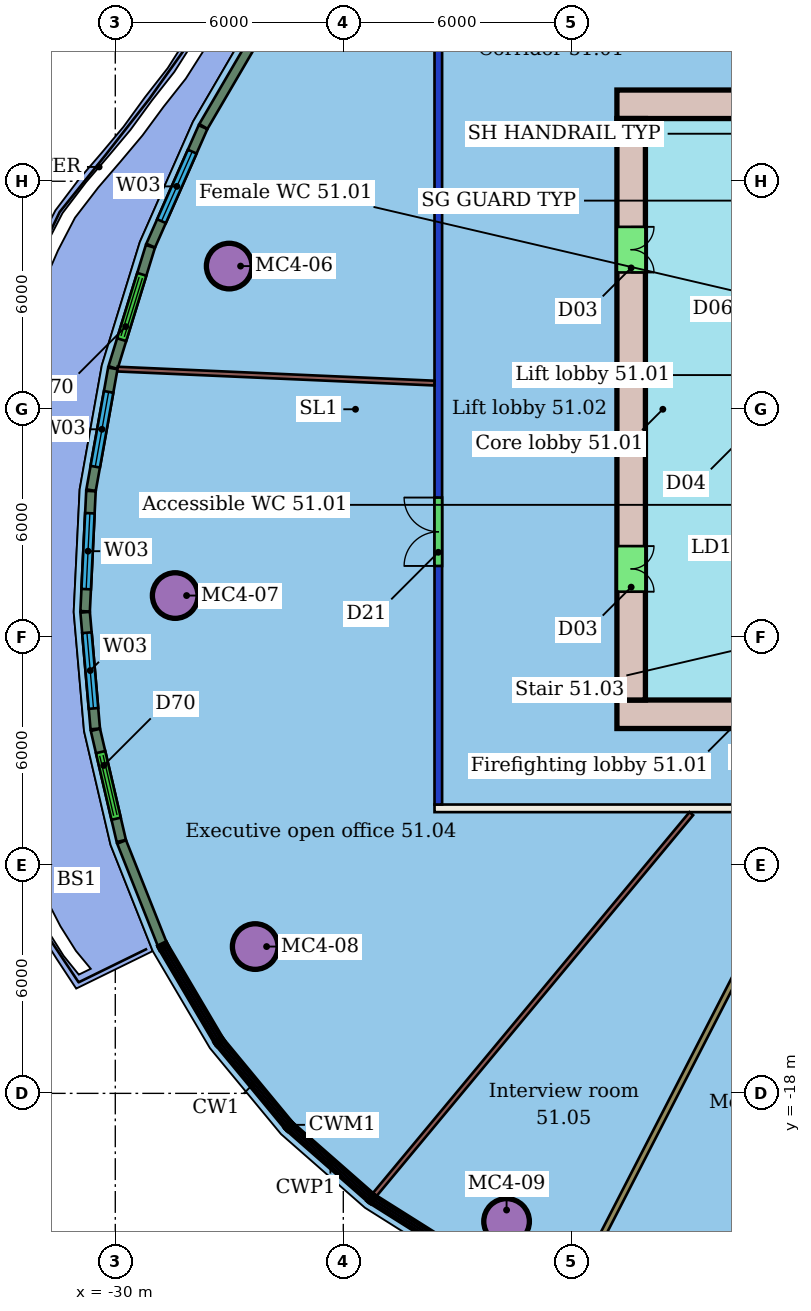
"""IFC4 building model, lengths in metres.
Left out: names, types, materials, properties, quantities, classifications, styles, units other than length and angle.
Written with IfcOpenShell. Run it as: python <this file> out.ifc"""

import sys

from ifc_helpers import new_model, si_unit, direction, frame, frame_2d, origin, origin_2d, place, context, subcontext, project, spatial, rectangle, hollow_circle, extrude, element, fill, save


model = new_model("IFC4")
c1 = context("Model", 3, precision=1e-05, world=origin(), true_north=direction((0.0, 1.0)))
c2 = subcontext(c1, "Body", "Model", "MODEL_VIEW")
j1 = project(units=[si_unit("LENGTHUNIT", "METRE"), si_unit("PLANEANGLEUNIT", "RADIAN")], contexts=[c1])
p1 = place(None, origin())
s1 = spatial("IfcSite", under=j1, at=p1, CompositionType="ELEMENT")
p2 = place(p1, origin())
s2 = spatial("IfcBuilding", under=s1, at=p2, CompositionType="ELEMENT")
p3 = place(p2, frame((0.0, 0.0, 210.1)))
s3 = spatial("IfcBuildingStorey", under=s2, at=p3, CompositionType="ELEMENT", Elevation=210.1)
for number, where, z_axis, x_axis in (
    (1, (-27.003, 3.768, 0.0), (0.0, 0.0, 1.0), (1.0, 0.0, 0.0)),
    (2, (-28.424, -4.901, 0.0), (0.0, 0.0, 1.0), (1.0, 0.0, 0.0)),
    (3, (-26.318, -14.137, 0.0), (0.0, 0.0, 1.0), (1.0, 0.0, 0.0)),
    (4, (-19.704, -21.37, 0.0), (0.0, 0.0, 1.0), (1.0, 0.0, 0.0)),
):
    element("IfcColumn", number, at=place(p3, frame(where, z_axis=z_axis, x_axis=x_axis)), inside=s3, PredefinedType="COLUMN", context=c2, shape_type="SweptSolid", body=[
        extrude(hollow_circle(Radius=0.6, WallThickness=0.045, at=origin_2d()), origin(), (0.0, 0.0, 1.0), 3.45),
    ])
p4 = place(p3, frame((9.6, -10.5, 0.0), z_axis=(0.0, 0.0, 1.0), x_axis=(-1.0, 0.0, 0.0)))
e5 = element("IfcWall", 5, at=p4, inside=s3, PredefinedType="PARTITIONING", context=c2, shape_type="SweptSolid", body=[
    extrude(rectangle(XDim=31.2, YDim=0.2, at=frame_2d((15.6, 0.0))), origin(), (0.0, 0.0, 1.0), 3.45),
])
p5 = place(p4, frame((21.96, 0.0, 0.0)))
e6 = element("IfcOpeningElement", 6, at=p5, cuts=e5, PredefinedType="OPENING", context=c2, shape_type="SweptSolid", body=[
    extrude(rectangle(XDim=0.9, YDim=2.1, at=frame_2d((0.45, 1.05))), frame((0.0, 0.11, 0.0), z_axis=(0.0, -1.0, 0.0), x_axis=(1.0, 0.0, 0.0)), (0.0, 0.0, 1.0), 0.22),
])
p6 = place(p4, frame((18.96, 0.0, 0.0)))
e7 = element("IfcOpeningElement", 7, at=p6, cuts=e5, PredefinedType="OPENING", context=c2, shape_type="SweptSolid", body=[
    extrude(rectangle(XDim=0.9, YDim=2.1, at=frame_2d((0.45, 1.05))), frame((0.0, 0.11, 0.0), z_axis=(0.0, -1.0, 0.0), x_axis=(1.0, 0.0, 0.0)), (0.0, 0.0, 1.0), 0.22),
])
p7 = place(p4, frame((8.428, 0.0, 0.0)))
e8 = element("IfcOpeningElement", 8, at=p7, cuts=e5, PredefinedType="OPENING", context=c2, shape_type="SweptSolid", body=[
    extrude(rectangle(XDim=1.8, YDim=2.4, at=frame_2d((0.9, 1.2))), frame((0.0, 0.11, 0.0), z_axis=(0.0, -1.0, 0.0), x_axis=(1.0, 0.0, 0.0)), (0.0, 0.0, 1.0), 0.22),
])
p8 = place(p4, frame((2.814, 0.0, 0.0)))
e9 = element("IfcOpeningElement", 9, at=p8, cuts=e5, PredefinedType="OPENING", context=c2, shape_type="SweptSolid", body=[
    extrude(rectangle(XDim=1.0, YDim=2.4, at=frame_2d((0.5, 1.2))), frame((0.0, 0.11, 0.0), z_axis=(0.0, -1.0, 0.0), x_axis=(1.0, 0.0, 0.0)), (0.0, 0.0, 1.0), 0.22),
])
p9 = place(p3, frame((-21.5, -10.4, 0.0), z_axis=(0.0, 0.0, 1.0), x_axis=(0.0, 1.0, 0.0)))
e10 = element("IfcWall", 10, at=p9, inside=s3, PredefinedType="PARTITIONING", context=c2, shape_type="SweptSolid", body=[
    extrude(rectangle(XDim=20.8, YDim=0.2, at=frame_2d((10.4, 0.0))), origin(), (0.0, 0.0, 1.0), 3.05),
])
p10 = place(p9, frame((6.277, 0.0, 0.0)))
e11 = element("IfcOpeningElement", 11, at=p10, cuts=e10, PredefinedType="OPENING", context=c2, shape_type="SweptSolid", body=[
    extrude(rectangle(XDim=1.8, YDim=2.1, at=frame_2d((0.9, 1.05))), frame((0.0, 0.11, 0.0), z_axis=(0.0, -1.0, 0.0), x_axis=(1.0, 0.0, 0.0)), (0.0, 0.0, 1.0), 0.22),
])
p11 = place(p3, frame((-29.941, 1.057, 0.0), z_axis=(0.0, 0.0, 1.0), x_axis=(0.999026681185, -0.044109979365, 0.0)))
e12 = element("IfcWall", 12, at=p11, inside=s3, PredefinedType="PARTITIONING", context=c2, shape_type="SweptSolid", body=[
    extrude(rectangle(XDim=8.346, YDim=0.125, at=frame_2d((4.173, 0.0))), origin(), (0.0, 0.0, 1.0), 3.45),
])
p12 = place(p3, frame((-23.177, -20.668, 0.0), z_axis=(0.0, 0.0, 1.0), x_axis=(0.639167269964, 0.769067747995, 0.0)))
e13 = element("IfcWall", 13, at=p12, inside=s3, PredefinedType="PARTITIONING", context=c2, shape_type="SweptSolid", body=[
    extrude(rectangle(XDim=13.04, YDim=0.125, at=frame_2d((6.52, 0.0))), origin(), (0.0, 0.0, 1.0), 3.45),
])
p13 = place(p3, frame((-18.025, -23.377, 0.0), z_axis=(0.0, 0.0, 1.0), x_axis=(0.457440787156, 0.88924008358, 0.0)))
e14 = element("IfcWall", 14, at=p13, inside=s3, PredefinedType="PARTITIONING", context=c2, shape_type="SweptSolid", body=[
    extrude(rectangle(XDim=14.33, YDim=0.15, at=frame_2d((7.165, 0.0))), origin(), (0.0, 0.0, 1.0), 3.45),
])
p14 = place(p3, frame((-25.956, 10.396, 0.0), z_axis=(0.0, 0.0, 1.0), x_axis=(-0.504456760021, -0.863436956164, 0.0)))
e15 = element("IfcWall", 15, at=p14, inside=s3, PredefinedType="SOLIDWALL", context=c2, shape_type="SweptSolid", body=[
    extrude(rectangle(XDim=3.42, YDim=0.25, at=frame_2d((1.71, 0.0))), origin(), (0.0, 0.0, 1.0), 3.1),
])
p15 = place(p3, frame((-27.691, 7.423, 0.0), z_axis=(0.0, 0.0, 1.0), x_axis=(-0.404116447322, -0.914707547254, 0.0)))
e16 = element("IfcWall", 16, at=p15, inside=s3, PredefinedType="SOLIDWALL", context=c2, shape_type="SweptSolid", body=[
    extrude(rectangle(XDim=3.407, YDim=0.25, at=frame_2d((1.704, 0.0))), origin(), (0.0, 0.0, 1.0), 3.1),
])
p16 = place(p15, frame((0.704, 0.0, 0.9)))
e17 = element("IfcOpeningElement", 17, at=p16, cuts=e16, PredefinedType="OPENING", context=c2, shape_type="SweptSolid", body=[
    extrude(rectangle(XDim=2.0, YDim=2.1, at=frame_2d((1.0, 1.05))), frame((0.0, 0.135, 0.0), z_axis=(0.0, -1.0, 0.0), x_axis=(1.0, 0.0, 0.0)), (0.0, 0.0, 1.0), 0.27),
])
p17 = place(p3, frame((-29.076, 4.285, 0.0), z_axis=(0.0, 0.0, 1.0), x_axis=(-0.294651514305, -0.955604774537, 0.0)))
e18 = element("IfcWall", 18, at=p17, inside=s3, PredefinedType="SOLIDWALL", context=c2, shape_type="SweptSolid", body=[
    extrude(rectangle(XDim=3.336, YDim=0.25, at=frame_2d((1.668, 0.0))), origin(), (0.0, 0.0, 1.0), 3.1),
])
p18 = place(p17, frame((0.768, 0.0, 0.0)))
e19 = element("IfcOpeningElement", 19, at=p18, cuts=e18, PredefinedType="OPENING", context=c2, shape_type="SweptSolid", body=[
    extrude(rectangle(XDim=1.8, YDim=2.4, at=frame_2d((0.9, 1.2))), frame((0.0, 0.135, 0.0), z_axis=(0.0, -1.0, 0.0), x_axis=(1.0, 0.0, 0.0)), (0.0, 0.0, 1.0), 0.27),
])
p19 = place(p3, frame((-30.065, 1.075, 0.0), z_axis=(0.0, 0.0, 1.0), x_axis=(-0.176006154206, -0.984389066214, 0.0)))
e20 = element("IfcWall", 20, at=p19, inside=s3, PredefinedType="SOLIDWALL", context=c2, shape_type="SweptSolid", body=[
    extrude(rectangle(XDim=3.254, YDim=0.25, at=frame_2d((1.627, 0.0))), origin(), (0.0, 0.0, 1.0), 3.1),
])
p20 = place(p19, frame((0.627, 0.0, 0.9)))
e21 = element("IfcOpeningElement", 21, at=p20, cuts=e20, PredefinedType="OPENING", context=c2, shape_type="SweptSolid", body=[
    extrude(rectangle(XDim=2.0, YDim=2.1, at=frame_2d((1.0, 1.05))), frame((0.0, 0.135, 0.0), z_axis=(0.0, -1.0, 0.0), x_axis=(1.0, 0.0, 0.0)), (0.0, 0.0, 1.0), 0.27),
])
p21 = place(p3, frame((-30.64, -2.152, 0.0), z_axis=(0.0, 0.0, 1.0), x_axis=(-0.048561254051, -0.998820206346, 0.0)))
e22 = element("IfcWall", 22, at=p21, inside=s3, PredefinedType="SOLIDWALL", context=c2, shape_type="SweptSolid", body=[
    extrude(rectangle(XDim=3.167, YDim=0.25, at=frame_2d((1.583, 0.0))), origin(), (0.0, 0.0, 1.0), 3.1),
])
p22 = place(p21, frame((0.584, 0.0, 0.9)))
e23 = element("IfcOpeningElement", 23, at=p22, cuts=e22, PredefinedType="OPENING", context=c2, shape_type="SweptSolid", body=[
    extrude(rectangle(XDim=2.0, YDim=2.1, at=frame_2d((1.0, 1.05))), frame((0.0, 0.135, 0.0), z_axis=(0.0, -1.0, 0.0), x_axis=(1.0, 0.0, 0.0)), (0.0, 0.0, 1.0), 0.27),
])
p23 = place(p3, frame((-30.793, -5.341, 0.0), z_axis=(0.0, 0.0, 1.0), x_axis=(0.086527038648, -0.996249502676, 0.0)))
e24 = element("IfcWall", 24, at=p23, inside=s3, PredefinedType="SOLIDWALL", context=c2, shape_type="SweptSolid", body=[
    extrude(rectangle(XDim=3.081, YDim=0.25, at=frame_2d((1.541, 0.0))), origin(), (0.0, 0.0, 1.0), 3.1),
])
p24 = place(p23, frame((0.541, 0.0, 0.9)))
e25 = element("IfcOpeningElement", 25, at=p24, cuts=e24, PredefinedType="OPENING", context=c2, shape_type="SweptSolid", body=[
    extrude(rectangle(XDim=2.0, YDim=2.1, at=frame_2d((1.0, 1.05))), frame((0.0, 0.135, 0.0), z_axis=(0.0, -1.0, 0.0), x_axis=(1.0, 0.0, 0.0)), (0.0, 0.0, 1.0), 0.27),
])
p25 = place(p3, frame((-30.523, -8.436, 0.0), z_axis=(0.0, 0.0, 1.0), x_axis=(0.226926203239, -0.973911956125, 0.0)))
e26 = element("IfcWall", 26, at=p25, inside=s3, PredefinedType="SOLIDWALL", context=c2, shape_type="SweptSolid", body=[
    extrude(rectangle(XDim=3.002, YDim=0.25, at=frame_2d((1.501, 0.0))), origin(), (0.0, 0.0, 1.0), 3.1),
])
p26 = place(p25, frame((0.601, 0.0, 0.0)))
e27 = element("IfcOpeningElement", 27, at=p26, cuts=e26, PredefinedType="OPENING", context=c2, shape_type="SweptSolid", body=[
    extrude(rectangle(XDim=1.8, YDim=2.4, at=frame_2d((0.9, 1.2))), frame((0.0, 0.135, 0.0), z_axis=(0.0, -1.0, 0.0), x_axis=(1.0, 0.0, 0.0)), (0.0, 0.0, 1.0), 0.27),
])
p27 = place(p3, frame((-29.833, -11.384, 0.0), z_axis=(0.0, 0.0, 1.0), x_axis=(0.369061887555, -0.929404821999, 0.0)))
e28 = element("IfcWall", 28, at=p27, inside=s3, PredefinedType="SOLIDWALL", context=c2, shape_type="SweptSolid", body=[
    extrude(rectangle(XDim=2.894, YDim=0.25, at=frame_2d((1.447, 0.0))), origin(), (0.0, 0.0, 1.0), 3.1),
])
p28 = place(p3, frame((-6.0, 8.025, 0.0), z_axis=(0.0, 0.0, 1.0), x_axis=(-1.0, 0.0, 0.0)))
e29 = element("IfcWall", 29, at=p28, inside=s3, PredefinedType="SHEAR", context=c2, shape_type="SweptSolid", body=[
    extrude(rectangle(XDim=10.8, YDim=0.75, at=frame_2d((5.4, 0.0))), origin(), (0.0, 0.0, 1.0), 3.3),
])
p29 = place(p28, frame((5.2, 0.0, 0.0)))
e30 = element("IfcOpeningElement", 30, at=p29, cuts=e29, PredefinedType="OPENING", context=c2, shape_type="SweptSolid", body=[
    extrude(rectangle(XDim=1.2, YDim=2.1, at=frame_2d((0.6, 1.05))), frame((0.0, 0.385, 0.0), z_axis=(0.0, -1.0, 0.0), x_axis=(1.0, 0.0, 0.0)), (0.0, 0.0, 1.0), 0.77),
])
p30 = place(p3, frame((-16.8, -8.025, 0.0), z_axis=(0.0, 0.0, 1.0), x_axis=(1.0, 0.0, 0.0)))
e31 = element("IfcWall", 31, at=p30, inside=s3, PredefinedType="SHEAR", context=c2, shape_type="SweptSolid", body=[
    extrude(rectangle(XDim=21.6, YDim=0.75, at=frame_2d((10.8, 0.0))), origin(), (0.0, 0.0, 1.0), 3.3),
])
p31 = place(p30, frame((4.8, 0.0, 0.0)))
e32 = element("IfcOpeningElement", 32, at=p31, cuts=e31, PredefinedType="OPENING", context=c2, shape_type="SweptSolid", body=[
    extrude(rectangle(XDim=1.2, YDim=2.1, at=frame_2d((0.6, 1.05))), frame((0.0, 0.385, 0.0), z_axis=(0.0, -1.0, 0.0), x_axis=(1.0, 0.0, 0.0)), (0.0, 0.0, 1.0), 0.77),
])
p32 = place(p3, frame((-16.425, 7.65, 0.0), z_axis=(0.0, 0.0, 1.0), x_axis=(0.0, -1.0, 0.0)))
e33 = element("IfcWall", 33, at=p32, inside=s3, PredefinedType="SHEAR", context=c2, shape_type="SweptSolid", body=[
    extrude(rectangle(XDim=15.3, YDim=0.75, at=frame_2d((7.65, 0.0))), origin(), (0.0, 0.0, 1.0), 3.3),
])
p33 = place(p32, frame((11.25, 0.0, 0.0)))
e34 = element("IfcOpeningElement", 34, at=p33, cuts=e33, PredefinedType="OPENING", context=c2, shape_type="SweptSolid", body=[
    extrude(rectangle(XDim=1.2, YDim=2.1, at=frame_2d((0.6, 1.05))), frame((0.0, 0.385, 0.0), z_axis=(0.0, -1.0, 0.0), x_axis=(1.0, 0.0, 0.0)), (0.0, 0.0, 1.0), 0.77),
])
p34 = place(p32, frame((2.85, 0.0, 0.0)))
e35 = element("IfcOpeningElement", 35, at=p34, cuts=e33, PredefinedType="OPENING", context=c2, shape_type="SweptSolid", body=[
    extrude(rectangle(XDim=1.2, YDim=2.1, at=frame_2d((0.6, 1.05))), frame((0.0, 0.385, 0.0), z_axis=(0.0, -1.0, 0.0), x_axis=(1.0, 0.0, 0.0)), (0.0, 0.0, 1.0), 0.77),
])
p35 = place(p10, origin())
e36 = element("IfcDoor", 36, at=p35, inside=s3, OperationType="DOUBLE_DOOR_SINGLE_SWING", PredefinedType="DOOR", context=c2, shape_type="SweptSolid", body=[
    extrude(rectangle(XDim=1.8, YDim=2.1, at=frame_2d((0.9, 1.05))), frame((0.0, 0.025, 0.0), z_axis=(0.0, -1.0, 0.0), x_axis=(1.0, 0.0, 0.0)), (0.0, 0.0, 1.0), 0.05),
])
fill(e11, e36)
p36 = place(p16, origin())
e37 = element("IfcWindow", 37, at=p36, inside=s3, PartitioningType="SINGLE_PANEL", PredefinedType="WINDOW", context=c2, shape_type="SweptSolid", body=[
    extrude(rectangle(XDim=2.0, YDim=2.1, at=frame_2d((1.0, 1.05))), frame((0.0, 0.03, 0.0), z_axis=(0.0, -1.0, 0.0), x_axis=(1.0, 0.0, 0.0)), (0.0, 0.0, 1.0), 0.06),
])
fill(e17, e37)
p37 = place(p18, origin())
e38 = element("IfcDoor", 38, at=p37, inside=s3, OperationType="DOUBLE_DOOR_SLIDING", PredefinedType="DOOR", context=c2, shape_type="SweptSolid", body=[
    extrude(rectangle(XDim=1.8, YDim=2.4, at=frame_2d((0.9, 1.2))), frame((0.0, 0.025, 0.0), z_axis=(0.0, -1.0, 0.0), x_axis=(1.0, 0.0, 0.0)), (0.0, 0.0, 1.0), 0.05),
])
fill(e19, e38)
p38 = place(p20, origin())
e39 = element("IfcWindow", 39, at=p38, inside=s3, PartitioningType="SINGLE_PANEL", PredefinedType="WINDOW", context=c2, shape_type="SweptSolid", body=[
    extrude(rectangle(XDim=2.0, YDim=2.1, at=frame_2d((1.0, 1.05))), frame((0.0, 0.03, 0.0), z_axis=(0.0, -1.0, 0.0), x_axis=(1.0, 0.0, 0.0)), (0.0, 0.0, 1.0), 0.06),
])
fill(e21, e39)
p39 = place(p22, origin())
e40 = element("IfcWindow", 40, at=p39, inside=s3, PartitioningType="SINGLE_PANEL", PredefinedType="WINDOW", context=c2, shape_type="SweptSolid", body=[
    extrude(rectangle(XDim=2.0, YDim=2.1, at=frame_2d((1.0, 1.05))), frame((0.0, 0.03, 0.0), z_axis=(0.0, -1.0, 0.0), x_axis=(1.0, 0.0, 0.0)), (0.0, 0.0, 1.0), 0.06),
])
fill(e23, e40)
p40 = place(p24, origin())
e41 = element("IfcWindow", 41, at=p40, inside=s3, PartitioningType="SINGLE_PANEL", PredefinedType="WINDOW", context=c2, shape_type="SweptSolid", body=[
    extrude(rectangle(XDim=2.0, YDim=2.1, at=frame_2d((1.0, 1.05))), frame((0.0, 0.03, 0.0), z_axis=(0.0, -1.0, 0.0), x_axis=(1.0, 0.0, 0.0)), (0.0, 0.0, 1.0), 0.06),
])
fill(e25, e41)
p41 = place(p26, origin())
e42 = element("IfcDoor", 42, at=p41, inside=s3, OperationType="DOUBLE_DOOR_SLIDING", PredefinedType="DOOR", context=c2, shape_type="SweptSolid", body=[
    extrude(rectangle(XDim=1.8, YDim=2.4, at=frame_2d((0.9, 1.2))), frame((0.0, 0.025, 0.0), z_axis=(0.0, -1.0, 0.0), x_axis=(1.0, 0.0, 0.0)), (0.0, 0.0, 1.0), 0.05),
])
fill(e27, e42)
p42 = place(p33, origin())
e43 = element("IfcDoor", 43, at=p42, inside=s3, OperationType="DOUBLE_DOOR_SINGLE_SWING", PredefinedType="NOTDEFINED", context=c2, shape_type="SweptSolid", body=[
    extrude(rectangle(XDim=1.2, YDim=2.1, at=frame_2d((0.6, 1.05))), frame((0.0, 0.025, 0.0), z_axis=(0.0, -1.0, 0.0), x_axis=(1.0, 0.0, 0.0)), (0.0, 0.0, 1.0), 0.05),
])
fill(e34, e43)
p43 = place(p34, origin())
e44 = element("IfcDoor", 44, at=p43, inside=s3, OperationType="DOUBLE_DOOR_SINGLE_SWING", PredefinedType="NOTDEFINED", context=c2, shape_type="SweptSolid", body=[
    extrude(rectangle(XDim=1.2, YDim=2.1, at=frame_2d((0.6, 1.05))), frame((0.0, 0.025, 0.0), z_axis=(0.0, -1.0, 0.0), x_axis=(1.0, 0.0, 0.0)), (0.0, 0.0, 1.0), 0.05),
])
fill(e35, e44)
save(model, sys.argv[1])
